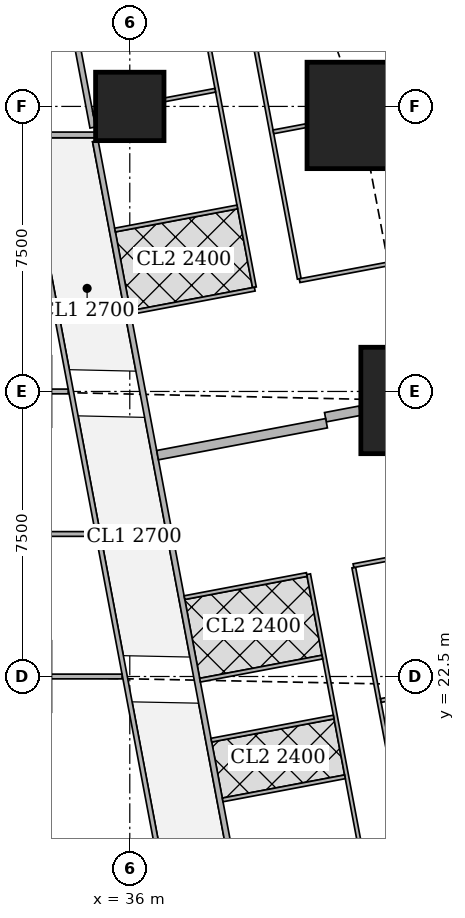
"""IFC4 building model, lengths in metres.
Left out: names, types, materials, properties, quantities, classifications, styles, units other than length and angle.
Written with IfcOpenShell. Run it as: python <this file> out.ifc"""

import sys

from ifc_helpers import new_model, si_unit, direction, frame, frame_2d, origin, origin_2d, place, context, subcontext, project, spatial, rectangle, extrude, element, fill, save


model = new_model("IFC4")
c1 = context("Model", 3, precision=1e-05, world=origin(), true_north=direction((0.0, 1.0)))
c2 = subcontext(c1, "Body", "Model", "MODEL_VIEW")
j1 = project(units=[si_unit("LENGTHUNIT", "METRE"), si_unit("PLANEANGLEUNIT", "RADIAN")], contexts=[c1])
p1 = place(None, origin())
s1 = spatial("IfcSite", under=j1, at=p1, CompositionType="ELEMENT")
p2 = place(p1, origin())
s2 = spatial("IfcBuilding", under=s1, at=p2, CompositionType="ELEMENT")
p3 = place(p2, frame((0.0, 0.0, 31.25)))
s3 = spatial("IfcBuildingStorey", under=s2, at=p3, CompositionType="ELEMENT", Elevation=31.25)
p4 = place(p3, frame((43.48, 29.763, 0.0), z_axis=(0.0, 0.0, 1.0), x_axis=(1.0, 0.0, 0.0)))
e1 = element("IfcColumn", 1, at=p4, inside=s3, PredefinedType="COLUMN", context=c2, shape_type="SweptSolid", body=[
    extrude(rectangle(XDim=2.8, YDim=2.8, at=origin_2d()), origin(), (0.0, 0.0, 1.0), 3.75),
])
p5 = place(p3, frame((36.0, 37.5, 0.0), z_axis=(0.0, 0.0, 1.0), x_axis=(1.0, 0.0, 0.0)))
e2 = element("IfcColumn", 2, at=p5, inside=s3, PredefinedType="COLUMN", context=c2, shape_type="SweptSolid", body=[
    extrude(rectangle(XDim=1.8, YDim=1.8, at=origin_2d()), origin(), (0.0, 0.0, 1.0), 3.75),
])
p6 = place(p3, frame((42.064, 37.263, 0.0), z_axis=(0.0, 0.0, 1.0), x_axis=(1.0, 0.0, 0.0)))
e3 = element("IfcColumn", 3, at=p6, inside=s3, PredefinedType="COLUMN", context=c2, shape_type="SweptSolid", body=[
    extrude(rectangle(XDim=2.8, YDim=2.8, at=origin_2d()), origin(), (0.0, 0.0, 1.0), 3.75),
])
p7 = place(p3, frame((29.701, 36.75, 0.0), z_axis=(0.0, 0.0, 1.0), x_axis=(1.0, 0.0, 0.0)))
e4 = element("IfcWall", 4, at=p7, inside=s3, PredefinedType="SOLIDWALL", context=c2, shape_type="SweptSolid", body=[
    extrude(rectangle(XDim=5.399, YDim=0.15, at=frame_2d((2.7, 0.0))), origin(), (0.0, 0.0, 1.0), 3.5),
])
p8 = place(p3, frame((33.933, 42.73, 0.0), z_axis=(0.0, 0.0, 1.0), x_axis=(0.185617897238, -0.982622000682, 0.0)))
e5 = element("IfcWall", 5, at=p8, inside=s3, PredefinedType="SOLIDWALL", context=c2, shape_type="SweptSolid", body=[
    extrude(rectangle(XDim=5.887, YDim=0.15, at=frame_2d((2.944, 0.0))), origin(), (0.0, 0.0, 1.0), 3.5),
])
p9 = place(p3, frame((35.094, 36.585, 0.0), z_axis=(0.0, 0.0, 1.0), x_axis=(0.185588860311, -0.982627485331, 0.0)))
e6 = element("IfcWall", 6, at=p9, inside=s3, PredefinedType="SOLIDWALL", context=c2, shape_type="SweptSolid", body=[
    extrude(rectangle(XDim=34.797, YDim=0.15, at=frame_2d((17.399, 0.0))), origin(), (0.0, 0.0, 1.0), 2.5),
])
p10 = place(p9, frame((6.012, 0.0, 0.0)))
e7 = element("IfcOpeningElement", 7, at=p10, cuts=e6, PredefinedType="OPENING", context=c2, shape_type="SweptSolid", body=[
    extrude(rectangle(XDim=1.0, YDim=2.1, at=frame_2d((0.5, 1.05))), frame((0.0, 0.085, 0.0), z_axis=(0.0, -1.0, 0.0), x_axis=(1.0, 0.0, 0.0)), (0.0, 0.0, 1.0), 0.17),
])
p11 = place(p9, frame((9.828, 0.0, 0.0)))
e8 = element("IfcOpeningElement", 8, at=p11, cuts=e6, PredefinedType="OPENING", context=c2, shape_type="SweptSolid", body=[
    extrude(rectangle(XDim=1.0, YDim=2.1, at=frame_2d((0.5, 1.05))), frame((0.0, 0.085, 0.0), z_axis=(0.0, -1.0, 0.0), x_axis=(1.0, 0.0, 0.0)), (0.0, 0.0, 1.0), 0.17),
])
p12 = place(p9, frame((25.9, 0.0, 0.0)))
e9 = element("IfcOpeningElement", 9, at=p12, cuts=e6, PredefinedType="OPENING", context=c2, shape_type="SweptSolid", body=[
    extrude(rectangle(XDim=1.0, YDim=2.1, at=frame_2d((0.5, 1.05))), frame((0.0, 0.085, 0.0), z_axis=(0.0, -1.0, 0.0), x_axis=(1.0, 0.0, 0.0)), (0.0, 0.0, 1.0), 0.17),
])
p13 = place(p3, frame((38.9, 41.22, 0.0), z_axis=(0.0, 0.0, 1.0), x_axis=(0.18556562412, -0.982631873666, 0.0)))
e10 = element("IfcWall", 10, at=p13, inside=s3, PredefinedType="PARTITIONING", context=c2, shape_type="SweptSolid", body=[
    extrude(rectangle(XDim=8.402, YDim=0.1, at=frame_2d((4.201, 0.0))), origin(), (0.0, 0.0, 1.0), 3.5),
])
p14 = place(p13, frame((7.352, 0.0, 0.0)))
e11 = element("IfcOpeningElement", 11, at=p14, cuts=e10, PredefinedType="OPENING", context=c2, shape_type="SweptSolid", body=[
    extrude(rectangle(XDim=0.9, YDim=2.1, at=frame_2d((0.45, 1.05))), frame((0.0, 0.06, 0.0), z_axis=(0.0, -1.0, 0.0), x_axis=(1.0, 0.0, 0.0)), (0.0, 0.0, 1.0), 0.12),
])
p15 = place(p13, frame((1.9, 0.0, 0.0)))
e12 = element("IfcOpeningElement", 12, at=p15, cuts=e10, PredefinedType="OPENING", context=c2, shape_type="SweptSolid", body=[
    extrude(rectangle(XDim=0.9, YDim=2.1, at=frame_2d((0.45, 1.05))), frame((0.0, 0.06, 0.0), z_axis=(0.0, -1.0, 0.0), x_axis=(1.0, 0.0, 0.0)), (0.0, 0.0, 1.0), 0.12),
])
p16 = place(p3, frame((37.514, 42.089, 0.0), z_axis=(0.0, 0.0, 1.0), x_axis=(0.185543450498, -0.982636060796, 0.0)))
e13 = element("IfcWall", 13, at=p16, inside=s3, PredefinedType="PARTITIONING", context=c2, shape_type="SweptSolid", body=[
    extrude(rectangle(XDim=9.513, YDim=0.1, at=frame_2d((4.757, 0.0))), origin(), (0.0, 0.0, 1.0), 3.5),
])
p17 = place(p16, frame((8.008, 0.0, 0.0)))
e14 = element("IfcOpeningElement", 14, at=p17, cuts=e13, PredefinedType="OPENING", context=c2, shape_type="SweptSolid", body=[
    extrude(rectangle(XDim=0.9, YDim=2.1, at=frame_2d((0.45, 1.05))), frame((0.0, 0.06, 0.0), z_axis=(0.0, -1.0, 0.0), x_axis=(1.0, 0.0, 0.0)), (0.0, 0.0, 1.0), 0.12),
])
p18 = place(p16, frame((2.63, 0.0, 0.0)))
e15 = element("IfcOpeningElement", 15, at=p18, cuts=e13, PredefinedType="OPENING", context=c2, shape_type="SweptSolid", body=[
    extrude(rectangle(XDim=0.9, YDim=2.1, at=frame_2d((0.45, 1.05))), frame((0.0, 0.06, 0.0), z_axis=(0.0, -1.0, 0.0), x_axis=(1.0, 0.0, 0.0)), (0.0, 0.0, 1.0), 0.12),
])
p19 = place(p16, frame((5.341, 0.0, 0.0)))
e16 = element("IfcOpeningElement", 16, at=p19, cuts=e13, PredefinedType="OPENING", context=c2, shape_type="SweptSolid", body=[
    extrude(rectangle(XDim=0.9, YDim=2.1, at=frame_2d((0.45, 1.05))), frame((0.0, 0.06, 0.0), z_axis=(0.0, -1.0, 0.0), x_axis=(1.0, 0.0, 0.0)), (0.0, 0.0, 1.0), 0.12),
])
p20 = place(p3, frame((40.654, 36.996, 0.0), z_axis=(0.0, 0.0, 1.0), x_axis=(-0.982672962335, -0.185347913655, 0.0)))
e17 = element("IfcWall", 17, at=p20, inside=s3, PredefinedType="PARTITIONING", context=c2, shape_type="SweptSolid", body=[
    extrude(rectangle(XDim=0.89, YDim=0.1, at=frame_2d((0.445, 0.0))), origin(), (0.0, 0.0, 1.0), 3.5),
])
p21 = place(p3, frame((44.693, 33.713, 0.0), z_axis=(0.0, 0.0, 1.0), x_axis=(-0.982633535512, -0.185556823879, 0.0)))
e18 = element("IfcWall", 18, at=p21, inside=s3, PredefinedType="PARTITIONING", context=c2, shape_type="SweptSolid", body=[
    extrude(rectangle(XDim=4.3, YDim=0.1, at=frame_2d((2.15, 0.0))), origin(), (0.0, 0.0, 1.0), 2.05),
])
p22 = place(p3, frame((38.25, 37.925, 0.0), z_axis=(0.0, 0.0, 1.0), x_axis=(-0.982650574676, -0.185466568658, 0.0)))
e19 = element("IfcWall", 19, at=p22, inside=s3, PredefinedType="PARTITIONING", context=c2, shape_type="SweptSolid", body=[
    extrude(rectangle(XDim=1.364, YDim=0.1, at=frame_2d((0.682, 0.0))), origin(), (0.0, 0.0, 1.0), 3.5),
])
p23 = place(p3, frame((35.09, 37.328, 0.0), z_axis=(0.0, 0.0, 1.0), x_axis=(-0.982590620415, -0.185783940835, 0.0)))
e20 = element("IfcWall", 20, at=p23, inside=s3, PredefinedType="PARTITIONING", context=c2, shape_type="SweptSolid", body=[
    extrude(rectangle(XDim=0.059, YDim=0.1, at=frame_2d((0.03, 0.0))), origin(), (0.0, 0.0, 1.0), 3.5),
])
p24 = place(p3, frame((39.289, 32.692, 0.0), z_axis=(0.0, 0.0, 1.0), x_axis=(-0.982633623707, -0.185556356831, 0.0)))
e21 = element("IfcWall", 21, at=p24, inside=s3, PredefinedType="PARTITIONING", context=c2, shape_type="SweptSolid", body=[
    extrude(rectangle(XDim=3.325, YDim=0.1, at=frame_2d((1.663, 0.0))), origin(), (0.0, 0.0, 1.0), 3.5),
])
p25 = place(p3, frame((38.829, 34.855, 0.0), z_axis=(0.0, 0.0, 1.0), x_axis=(-0.982610347627, -0.185679575441, 0.0)))
e22 = element("IfcWall", 22, at=p25, inside=s3, PredefinedType="PARTITIONING", context=c2, shape_type="SweptSolid", body=[
    extrude(rectangle(XDim=3.274, YDim=0.1, at=frame_2d((1.637, 0.0))), origin(), (0.0, 0.0, 1.0), 3.5),
])
p26 = place(p3, frame((41.894, 25.366, 0.0), z_axis=(0.0, 0.0, 1.0), x_axis=(0.185581190027, -0.982628933987, 0.0)))
e23 = element("IfcWall", 23, at=p26, inside=s3, PredefinedType="PARTITIONING", context=c2, shape_type="SweptSolid", body=[
    extrude(rectangle(XDim=9.623, YDim=0.1, at=frame_2d((4.812, 0.0))), origin(), (0.0, 0.0, 1.0), 2.5),
])
p27 = place(p26, frame((0.151, 0.0, 0.0)))
e24 = element("IfcOpeningElement", 24, at=p27, cuts=e23, PredefinedType="OPENING", context=c2, shape_type="SweptSolid", body=[
    extrude(rectangle(XDim=0.9, YDim=2.1, at=frame_2d((0.45, 1.05))), frame((0.0, 0.06, 0.0), z_axis=(0.0, -1.0, 0.0), x_axis=(1.0, 0.0, 0.0)), (0.0, 0.0, 1.0), 0.12),
])
p28 = place(p26, frame((5.05, 0.0, 0.0)))
e25 = element("IfcOpeningElement", 25, at=p28, cuts=e23, PredefinedType="OPENING", context=c2, shape_type="SweptSolid", body=[
    extrude(rectangle(XDim=0.9, YDim=2.1, at=frame_2d((0.45, 1.05))), frame((0.0, 0.06, 0.0), z_axis=(0.0, -1.0, 0.0), x_axis=(1.0, 0.0, 0.0)), (0.0, 0.0, 1.0), 0.12),
])
p29 = place(p3, frame((40.706, 25.192, 0.0), z_axis=(0.0, 0.0, 1.0), x_axis=(0.185572668944, -0.982630543257, 0.0)))
e26 = element("IfcWall", 26, at=p29, inside=s3, PredefinedType="PARTITIONING", context=c2, shape_type="SweptSolid", body=[
    extrude(rectangle(XDim=9.446, YDim=0.1, at=frame_2d((4.723, 0.0))), origin(), (0.0, 0.0, 1.0), 2.5),
])
p30 = place(p29, frame((0.655, 0.0, 0.0)))
e27 = element("IfcOpeningElement", 27, at=p30, cuts=e26, PredefinedType="OPENING", context=c2, shape_type="SweptSolid", body=[
    extrude(rectangle(XDim=0.9, YDim=2.1, at=frame_2d((0.45, 1.05))), frame((0.0, 0.06, 0.0), z_axis=(0.0, -1.0, 0.0), x_axis=(1.0, 0.0, 0.0)), (0.0, 0.0, 1.0), 0.12),
])
p31 = place(p29, frame((4.166, 0.0, 0.0)))
e28 = element("IfcOpeningElement", 28, at=p31, cuts=e26, PredefinedType="OPENING", context=c2, shape_type="SweptSolid", body=[
    extrude(rectangle(XDim=0.9, YDim=2.1, at=frame_2d((0.45, 1.05))), frame((0.0, 0.06, 0.0), z_axis=(0.0, -1.0, 0.0), x_axis=(1.0, 0.0, 0.0)), (0.0, 0.0, 1.0), 0.12),
])
p32 = place(p29, frame((8.396, 0.0, 0.0)))
e29 = element("IfcOpeningElement", 29, at=p32, cuts=e26, PredefinedType="OPENING", context=c2, shape_type="SweptSolid", body=[
    extrude(rectangle(XDim=0.9, YDim=2.1, at=frame_2d((0.45, 1.05))), frame((0.0, 0.06, 0.0), z_axis=(0.0, -1.0, 0.0), x_axis=(1.0, 0.0, 0.0)), (0.0, 0.0, 1.0), 0.12),
])
p33 = place(p29, frame((2.563, 0.0, 0.0)))
e30 = element("IfcOpeningElement", 30, at=p33, cuts=e26, PredefinedType="OPENING", context=c2, shape_type="SweptSolid", body=[
    extrude(rectangle(XDim=0.9, YDim=2.1, at=frame_2d((0.45, 1.05))), frame((0.0, 0.06, 0.0), z_axis=(0.0, -1.0, 0.0), x_axis=(1.0, 0.0, 0.0)), (0.0, 0.0, 1.0), 0.12),
])
p34 = place(p29, frame((6.074, 0.0, 0.0)))
e31 = element("IfcOpeningElement", 31, at=p34, cuts=e26, PredefinedType="OPENING", context=c2, shape_type="SweptSolid", body=[
    extrude(rectangle(XDim=0.9, YDim=2.1, at=frame_2d((0.45, 1.05))), frame((0.0, 0.06, 0.0), z_axis=(0.0, -1.0, 0.0), x_axis=(1.0, 0.0, 0.0)), (0.0, 0.0, 1.0), 0.12),
])
p35 = place(p3, frame((46.11, 26.213, 0.0), z_axis=(0.0, 0.0, 1.0), x_axis=(-0.982633535512, -0.185556823879, 0.0)))
e32 = element("IfcWall", 32, at=p35, inside=s3, PredefinedType="PARTITIONING", context=c2, shape_type="SweptSolid", body=[
    extrude(rectangle(XDim=4.3, YDim=0.1, at=frame_2d((2.15, 0.0))), origin(), (0.0, 0.0, 1.0), 2.05),
])
p36 = place(p3, frame((42.887, 21.921, 0.0), z_axis=(0.0, 0.0, 1.0), x_axis=(-0.982688058078, -0.185267861514, 0.0)))
e33 = element("IfcWall", 33, at=p36, inside=s3, PredefinedType="PARTITIONING", context=c2, shape_type="SweptSolid", body=[
    extrude(rectangle(XDim=0.286, YDim=0.1, at=frame_2d((0.143, 0.0))), origin(), (0.0, 0.0, 1.0), 2.5),
])
for number, where, z_axis, x_axis in (
    (34, (40.657, 25.183, 0.0), (0.0, 0.0, 1.0), (-0.983, -0.186, 0.0)),
    (35, (41.365, 21.433, 0.0), (0.0, 0.0, 1.0), (-0.983, -0.186, 0.0)),
):
    element("IfcWall", number, at=place(p3, frame(where, z_axis=z_axis, x_axis=x_axis)), inside=s3, PredefinedType="PARTITIONING", context=c2, shape_type="SweptSolid", body=[
        extrude(rectangle(XDim=3.275, YDim=0.1, at=frame_2d((1.637, 0.0))), origin(), (0.0, 0.0, 1.0), 3.5),
    ])
p37 = place(p3, frame((41.067, 23.011, 0.0), z_axis=(0.0, 0.0, 1.0), x_axis=(-0.982618057925, -0.185638768151, 0.0)))
e36 = element("IfcWall", 36, at=p37, inside=s3, PredefinedType="PARTITIONING", context=c2, shape_type="SweptSolid", body=[
    extrude(rectangle(XDim=3.275, YDim=0.1, at=frame_2d((1.637, 0.0))), origin(), (0.0, 0.0, 1.0), 2.5),
])
p38 = place(p3, frame((41.662, 19.861, 0.0), z_axis=(0.0, 0.0, 1.0), x_axis=(-0.982607026909, -0.185697147715, 0.0)))
e37 = element("IfcWall", 37, at=p38, inside=s3, PredefinedType="PARTITIONING", context=c2, shape_type="SweptSolid", body=[
    extrude(rectangle(XDim=3.275, YDim=0.1, at=frame_2d((1.637, 0.0))), origin(), (0.0, 0.0, 1.0), 3.5),
])
p39 = place(p3, frame((42.056, 29.494, 0.0), z_axis=(0.0, 0.0, 1.0), x_axis=(-0.982587178881, -0.185802141803, 0.0)))
e38 = element("IfcWall", 38, at=p39, inside=s3, PredefinedType="SOLIDWALL", context=c2, shape_type="SweptSolid", body=[
    extrude(rectangle(XDim=0.925, YDim=0.25, at=frame_2d((0.462, 0.0))), origin(), (0.0, 0.0, 1.0), 2.5),
])
p40 = place(p3, frame((41.177, 29.164, 0.0), z_axis=(0.0, 0.0, 1.0), x_axis=(-0.982612837616, -0.185666398014, 0.0)))
e39 = element("IfcWall", 39, at=p40, inside=s3, PredefinedType="SOLIDWALL", context=c2, shape_type="SweptSolid", body=[
    extrude(rectangle(XDim=4.525, YDim=0.25, at=frame_2d((2.262, 0.0))), origin(), (0.0, 0.0, 1.0), 2.5),
])
p41 = place(p3, frame((38.202, 10.163, 0.0), z_axis=(0.0, 0.0, 1.0), x_axis=(-0.185610321132, 0.982623431783, 0.0)))
e40 = element("IfcWall", 40, at=p41, inside=s3, PredefinedType="PARTITIONING", context=c2, shape_type="SweptSolid", body=[
    extrude(rectangle(XDim=25.111, YDim=0.125, at=frame_2d((12.556, 0.0))), origin(), (0.0, 0.0, 1.0), 2.5),
])
p42 = place(p41, frame((0.708, 0.0, 0.0)))
e41 = element("IfcOpeningElement", 41, at=p42, cuts=e40, PredefinedType="OPENING", context=c2, shape_type="SweptSolid", body=[
    extrude(rectangle(XDim=1.0, YDim=2.1, at=frame_2d((0.5, 1.05))), frame((0.0, 0.073, 0.0), z_axis=(0.0, -1.0, 0.0), x_axis=(1.0, 0.0, 0.0)), (0.0, 0.0, 1.0), 0.145),
])
p43 = place(p41, frame((6.1, 0.0, 0.0)))
e42 = element("IfcOpeningElement", 42, at=p43, cuts=e40, PredefinedType="OPENING", context=c2, shape_type="SweptSolid", body=[
    extrude(rectangle(XDim=1.0, YDim=2.1, at=frame_2d((0.5, 1.05))), frame((0.0, 0.073, 0.0), z_axis=(0.0, -1.0, 0.0), x_axis=(1.0, 0.0, 0.0)), (0.0, 0.0, 1.0), 0.145),
])
p44 = place(p41, frame((13.378, 0.0, 0.0)))
e43 = element("IfcOpeningElement", 43, at=p44, cuts=e40, PredefinedType="OPENING", context=c2, shape_type="SweptSolid", body=[
    extrude(rectangle(XDim=1.0, YDim=2.1, at=frame_2d((0.5, 1.05))), frame((0.0, 0.073, 0.0), z_axis=(0.0, -1.0, 0.0), x_axis=(1.0, 0.0, 0.0)), (0.0, 0.0, 1.0), 0.145),
])
p45 = place(p41, frame((17.194, 0.0, 0.0)))
e44 = element("IfcOpeningElement", 44, at=p45, cuts=e40, PredefinedType="OPENING", context=c2, shape_type="SweptSolid", body=[
    extrude(rectangle(XDim=1.0, YDim=2.1, at=frame_2d((0.5, 1.05))), frame((0.0, 0.073, 0.0), z_axis=(0.0, -1.0, 0.0), x_axis=(1.0, 0.0, 0.0)), (0.0, 0.0, 1.0), 0.145),
])
p46 = place(p41, frame((21.35, 0.0, 0.0)))
e45 = element("IfcOpeningElement", 45, at=p46, cuts=e40, PredefinedType="OPENING", context=c2, shape_type="SweptSolid", body=[
    extrude(rectangle(XDim=1.0, YDim=2.1, at=frame_2d((0.5, 1.05))), frame((0.0, 0.073, 0.0), z_axis=(0.0, -1.0, 0.0), x_axis=(1.0, 0.0, 0.0)), (0.0, 0.0, 1.0), 0.145),
])
p47 = place(p3, frame((33.901, 22.5, 0.0), z_axis=(0.0, 0.0, 1.0), x_axis=(1.0, 0.0, 0.0)))
e46 = element("IfcWall", 46, at=p47, inside=s3, PredefinedType="PARTITIONING", context=c2, shape_type="SweptSolid", body=[
    extrude(rectangle(XDim=1.895, YDim=0.125, at=frame_2d((0.948, 0.0))), origin(), (0.0, 0.0, 1.0), 2.5),
])
p48 = place(p3, frame((29.25, 26.25, 0.0), z_axis=(0.0, 0.0, 1.0), x_axis=(1.0, 0.0, 0.0)))
e47 = element("IfcWall", 47, at=p48, inside=s3, PredefinedType="PARTITIONING", context=c2, shape_type="SweptSolid", body=[
    extrude(rectangle(XDim=5.838, YDim=0.125, at=frame_2d((2.919, 0.0))), origin(), (0.0, 0.0, 1.0), 3.5),
])
p49 = place(p3, frame((33.901, 30.0, 0.0), z_axis=(0.0, 0.0, 1.0), x_axis=(1.0, 0.0, 0.0)))
e48 = element("IfcWall", 48, at=p49, inside=s3, PredefinedType="PARTITIONING", context=c2, shape_type="SweptSolid", body=[
    extrude(rectangle(XDim=0.478, YDim=0.125, at=frame_2d((0.239, 0.0))), origin(), (0.0, 0.0, 1.0), 2.5),
])
p50 = place(p14, origin())
e49 = element("IfcDoor", 49, at=p50, inside=s3, OperationType="SINGLE_SWING_RIGHT", PredefinedType="DOOR", context=c2, shape_type="SweptSolid", body=[
    extrude(rectangle(XDim=0.9, YDim=2.1, at=frame_2d((0.45, 1.05))), frame((0.0, 0.025, 0.0), z_axis=(0.0, -1.0, 0.0), x_axis=(1.0, 0.0, 0.0)), (0.0, 0.0, 1.0), 0.05),
])
fill(e11, e49)
p51 = place(p15, origin())
e50 = element("IfcDoor", 50, at=p51, inside=s3, OperationType="SINGLE_SWING_LEFT", PredefinedType="DOOR", context=c2, shape_type="SweptSolid", body=[
    extrude(rectangle(XDim=0.9, YDim=2.1, at=frame_2d((0.45, 1.05))), frame((0.0, 0.025, 0.0), z_axis=(0.0, -1.0, 0.0), x_axis=(1.0, 0.0, 0.0)), (0.0, 0.0, 1.0), 0.05),
])
fill(e12, e50)
p52 = place(p17, origin())
e51 = element("IfcDoor", 51, at=p52, inside=s3, OperationType="SINGLE_SWING_LEFT", PredefinedType="DOOR", context=c2, shape_type="SweptSolid", body=[
    extrude(rectangle(XDim=0.9, YDim=2.1, at=frame_2d((0.45, 1.05))), frame((0.0, 0.025, 0.0), z_axis=(0.0, -1.0, 0.0), x_axis=(1.0, 0.0, 0.0)), (0.0, 0.0, 1.0), 0.05),
])
fill(e14, e51)
p53 = place(p18, origin())
e52 = element("IfcDoor", 52, at=p53, inside=s3, OperationType="SINGLE_SWING_LEFT", PredefinedType="DOOR", context=c2, shape_type="SweptSolid", body=[
    extrude(rectangle(XDim=0.9, YDim=2.1, at=frame_2d((0.45, 1.05))), frame((0.0, 0.025, 0.0), z_axis=(0.0, -1.0, 0.0), x_axis=(1.0, 0.0, 0.0)), (0.0, 0.0, 1.0), 0.05),
])
fill(e15, e52)
p54 = place(p19, origin())
e53 = element("IfcDoor", 53, at=p54, inside=s3, OperationType="SINGLE_SWING_LEFT", PredefinedType="DOOR", context=c2, shape_type="SweptSolid", body=[
    extrude(rectangle(XDim=0.9, YDim=2.1, at=frame_2d((0.45, 1.05))), frame((0.0, 0.025, 0.0), z_axis=(0.0, -1.0, 0.0), x_axis=(1.0, 0.0, 0.0)), (0.0, 0.0, 1.0), 0.05),
])
fill(e16, e53)
p55 = place(p10, origin())
e54 = element("IfcDoor", 54, at=p55, inside=s3, OperationType="SINGLE_SWING_RIGHT", PredefinedType="DOOR", context=c2, shape_type="SweptSolid", body=[
    extrude(rectangle(XDim=1.0, YDim=2.1, at=frame_2d((0.5, 1.05))), frame((0.0, 0.025, 0.0), z_axis=(0.0, -1.0, 0.0), x_axis=(1.0, 0.0, 0.0)), (0.0, 0.0, 1.0), 0.05),
])
fill(e7, e54)
p56 = place(p27, origin())
e55 = element("IfcDoor", 55, at=p56, inside=s3, OperationType="SINGLE_SWING_LEFT", PredefinedType="DOOR", context=c2, shape_type="SweptSolid", body=[
    extrude(rectangle(XDim=0.9, YDim=2.1, at=frame_2d((0.45, 1.05))), frame((0.0, 0.025, 0.0), z_axis=(0.0, -1.0, 0.0), x_axis=(1.0, 0.0, 0.0)), (0.0, 0.0, 1.0), 0.05),
])
fill(e24, e55)
p57 = place(p30, origin())
e56 = element("IfcDoor", 56, at=p57, inside=s3, OperationType="SINGLE_SWING_RIGHT", PredefinedType="DOOR", context=c2, shape_type="SweptSolid", body=[
    extrude(rectangle(XDim=0.9, YDim=2.1, at=frame_2d((0.45, 1.05))), frame((0.0, 0.025, 0.0), z_axis=(0.0, -1.0, 0.0), x_axis=(1.0, 0.0, 0.0)), (0.0, 0.0, 1.0), 0.05),
])
fill(e27, e56)
p58 = place(p31, origin())
e57 = element("IfcDoor", 57, at=p58, inside=s3, OperationType="SINGLE_SWING_RIGHT", PredefinedType="DOOR", context=c2, shape_type="SweptSolid", body=[
    extrude(rectangle(XDim=0.9, YDim=2.1, at=frame_2d((0.45, 1.05))), frame((0.0, 0.025, 0.0), z_axis=(0.0, -1.0, 0.0), x_axis=(1.0, 0.0, 0.0)), (0.0, 0.0, 1.0), 0.05),
])
fill(e28, e57)
p59 = place(p33, origin())
e58 = element("IfcDoor", 58, at=p59, inside=s3, OperationType="SINGLE_SWING_LEFT", PredefinedType="DOOR", context=c2, shape_type="SweptSolid", body=[
    extrude(rectangle(XDim=0.9, YDim=2.1, at=frame_2d((0.45, 1.05))), frame((0.0, 0.025, 0.0), z_axis=(0.0, -1.0, 0.0), x_axis=(1.0, 0.0, 0.0)), (0.0, 0.0, 1.0), 0.05),
])
fill(e30, e58)
p60 = place(p34, origin())
e59 = element("IfcDoor", 59, at=p60, inside=s3, OperationType="SINGLE_SWING_LEFT", PredefinedType="DOOR", context=c2, shape_type="SweptSolid", body=[
    extrude(rectangle(XDim=0.9, YDim=2.1, at=frame_2d((0.45, 1.05))), frame((0.0, 0.025, 0.0), z_axis=(0.0, -1.0, 0.0), x_axis=(1.0, 0.0, 0.0)), (0.0, 0.0, 1.0), 0.05),
])
fill(e31, e59)
p61 = place(p11, origin())
e60 = element("IfcDoor", 60, at=p61, inside=s3, OperationType="SINGLE_SWING_LEFT", PredefinedType="DOOR", context=c2, shape_type="SweptSolid", body=[
    extrude(rectangle(XDim=1.0, YDim=2.1, at=frame_2d((0.5, 1.05))), frame((0.0, 0.025, 0.0), z_axis=(0.0, -1.0, 0.0), x_axis=(1.0, 0.0, 0.0)), (0.0, 0.0, 1.0), 0.05),
])
fill(e8, e60)
p62 = place(p44, origin())
e61 = element("IfcDoor", 61, at=p62, inside=s3, OperationType="SINGLE_SWING_LEFT", PredefinedType="DOOR", context=c2, shape_type="SweptSolid", body=[
    extrude(rectangle(XDim=1.0, YDim=2.1, at=frame_2d((0.5, 1.05))), frame((0.0, 0.025, 0.0), z_axis=(0.0, -1.0, 0.0), x_axis=(1.0, 0.0, 0.0)), (0.0, 0.0, 1.0), 0.05),
])
fill(e43, e61)
p63 = place(p45, origin())
e62 = element("IfcDoor", 62, at=p63, inside=s3, OperationType="SINGLE_SWING_LEFT", PredefinedType="DOOR", context=c2, shape_type="SweptSolid", body=[
    extrude(rectangle(XDim=1.0, YDim=2.1, at=frame_2d((0.5, 1.05))), frame((0.0, 0.025, 0.0), z_axis=(0.0, -1.0, 0.0), x_axis=(1.0, 0.0, 0.0)), (0.0, 0.0, 1.0), 0.05),
])
fill(e44, e62)
p64 = place(p46, origin())
e63 = element("IfcDoor", 63, at=p64, inside=s3, OperationType="SINGLE_SWING_LEFT", PredefinedType="DOOR", context=c2, shape_type="SweptSolid", body=[
    extrude(rectangle(XDim=1.0, YDim=2.1, at=frame_2d((0.5, 1.05))), frame((0.0, 0.025, 0.0), z_axis=(0.0, -1.0, 0.0), x_axis=(1.0, 0.0, 0.0)), (0.0, 0.0, 1.0), 0.05),
])
fill(e45, e63)
save(model, sys.argv[1])
